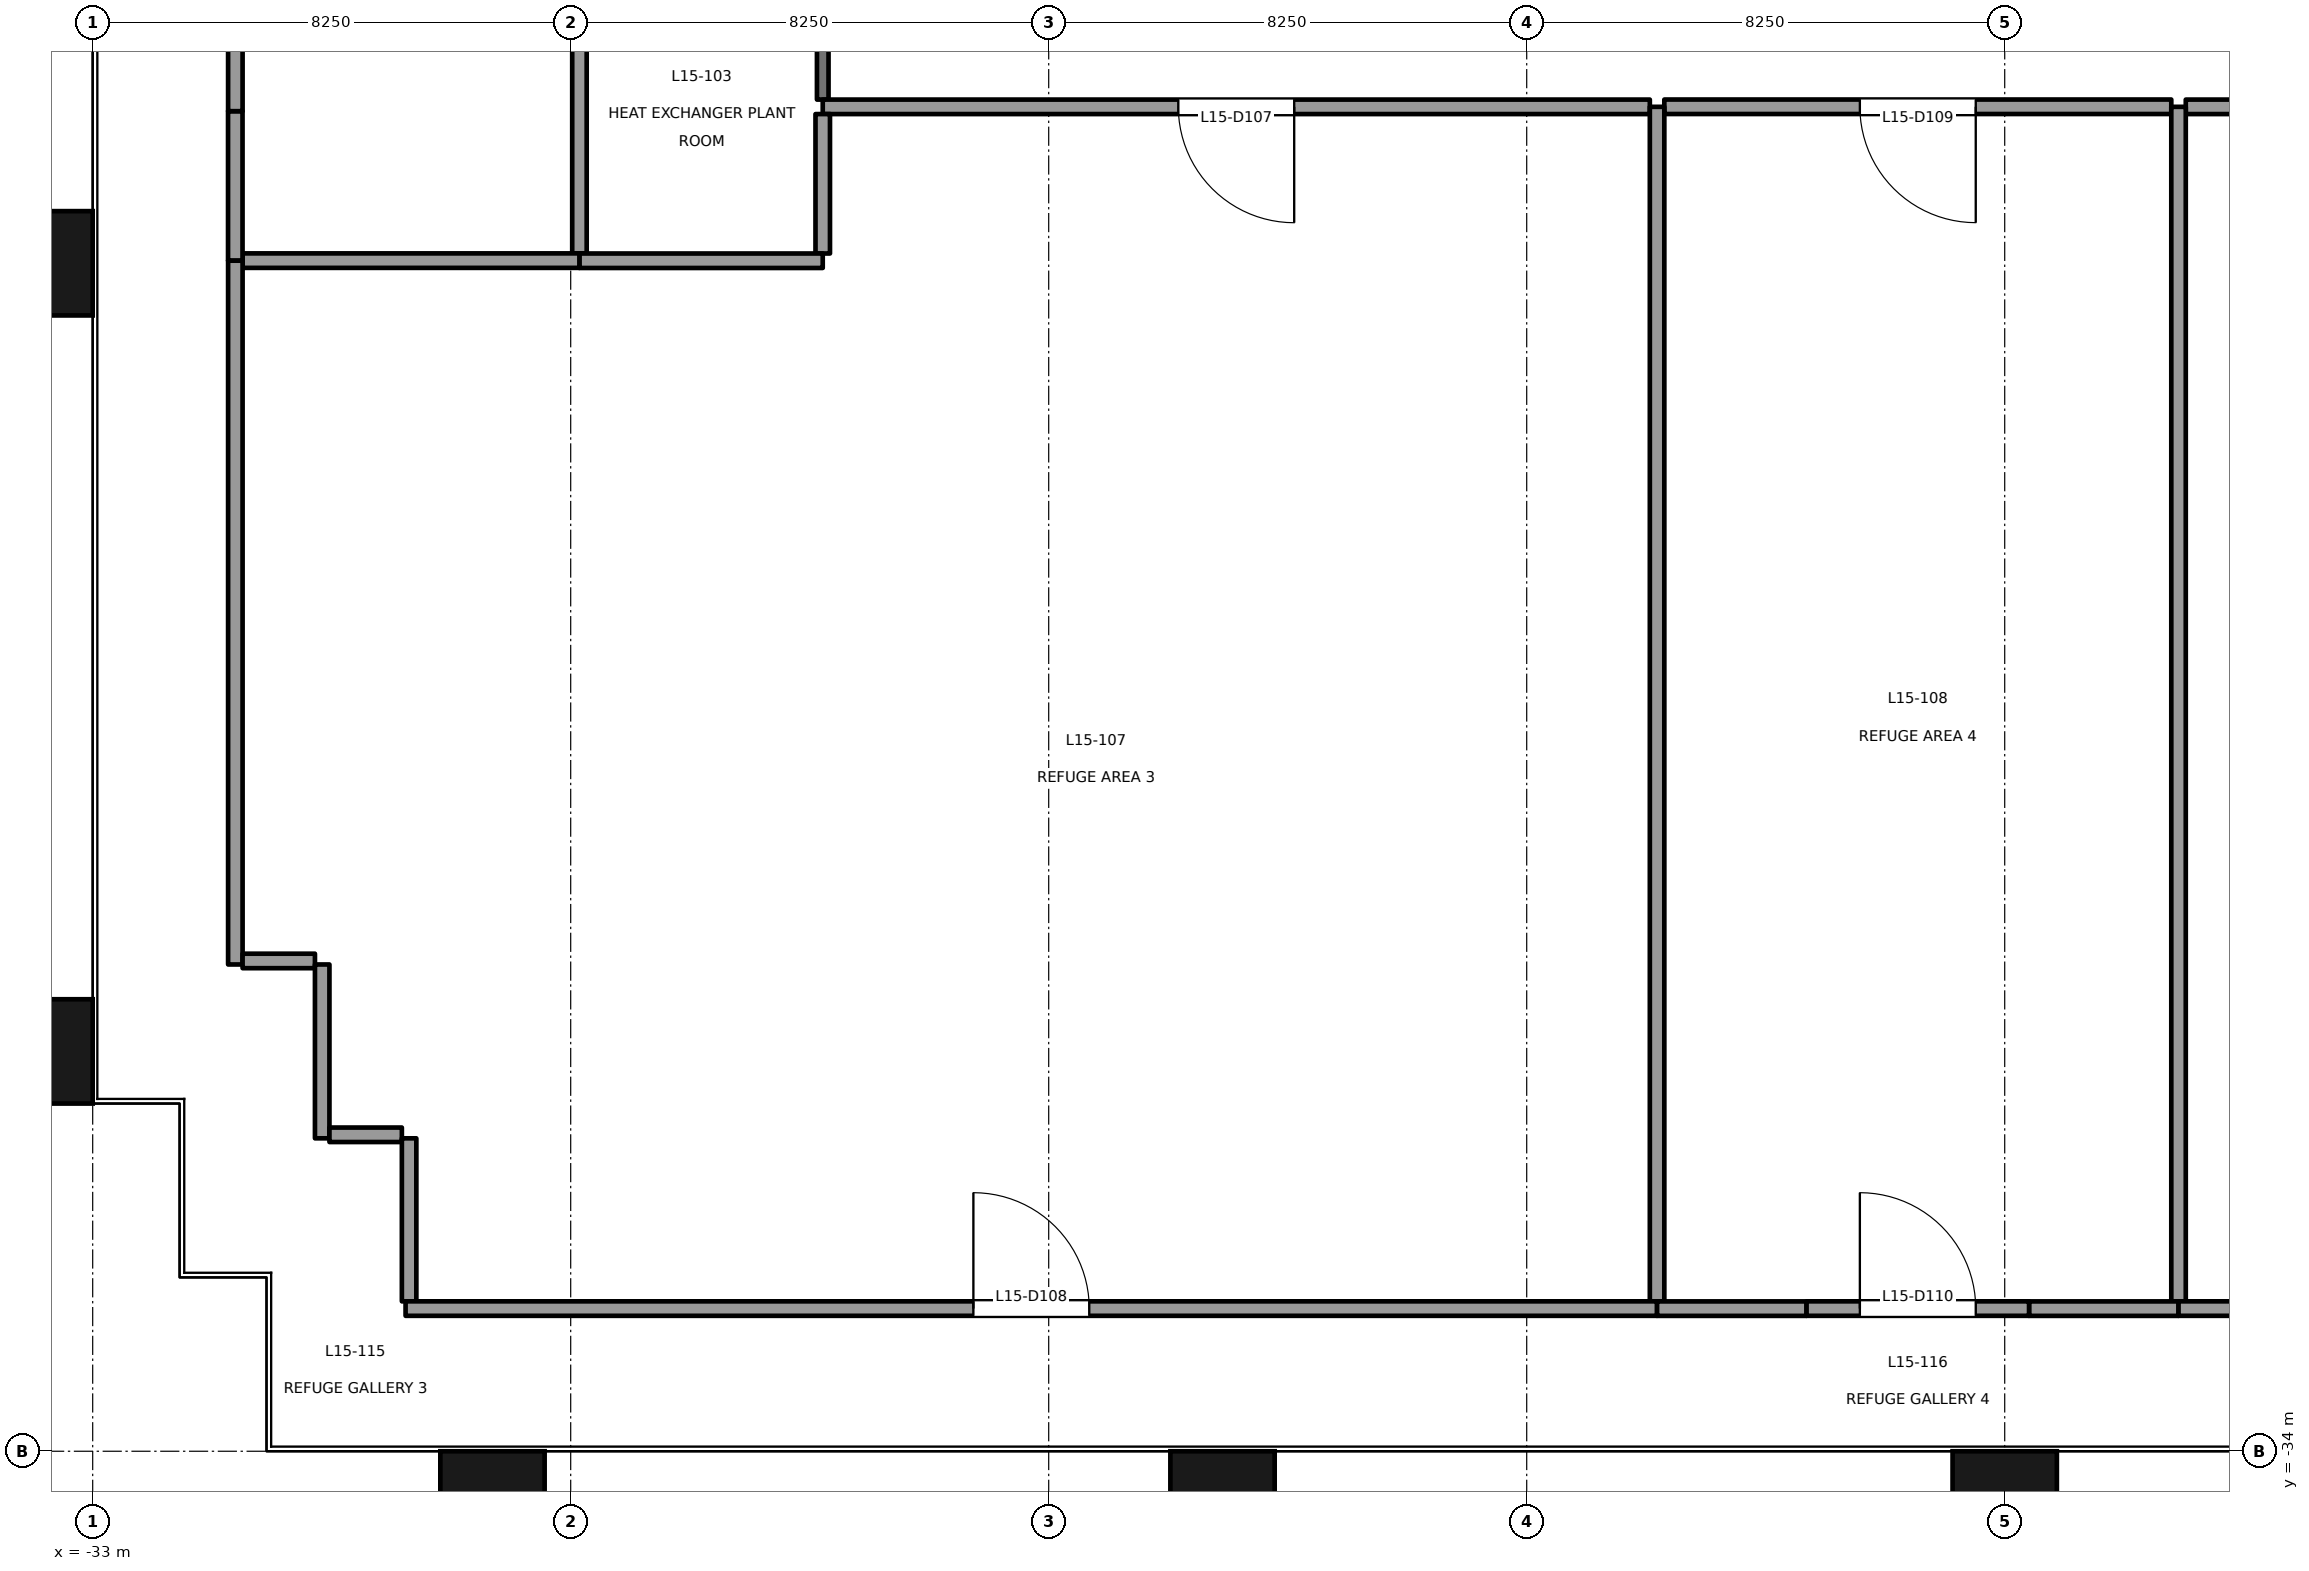
"""IFC4 building model, lengths in metres.
Left out: names, types, materials, properties, quantities, classifications, styles, units other than length and angle.
Written with IfcOpenShell. Run it as: python <this file> out.ifc"""

import sys

from ifc_helpers import new_model, si_unit, direction, frame, frame_2d, origin, origin_2d, place, context, subcontext, project, spatial, rectangle, extrude, element, fill, save


model = new_model("IFC4")
c1 = context("Model", 3, precision=1e-05, world=origin(), true_north=direction((0.0, 1.0)))
c2 = subcontext(c1, "Body", "Model", "MODEL_VIEW")
j1 = project(units=[si_unit("LENGTHUNIT", "METRE"), si_unit("PLANEANGLEUNIT", "RADIAN")], contexts=[c1])
p1 = place(None, origin())
s1 = spatial("IfcSite", under=j1, at=p1, CompositionType="ELEMENT")
p2 = place(p1, origin())
s2 = spatial("IfcBuilding", under=s1, at=p2, CompositionType="ELEMENT")
p3 = place(p2, frame((0.0, 0.0, 69.3)))
s3 = spatial("IfcBuildingStorey", under=s2, at=p3, CompositionType="ELEMENT", Elevation=69.3)
for number, where, z_axis, x_axis in (
    (1, (-26.1, -34.9, -0.2), (0.0, 0.0, 1.0), (1.0, 0.0, 0.0)),
    (2, (-13.5, -34.9, -0.2), (0.0, 0.0, 1.0), (1.0, 0.0, 0.0)),
    (3, (0.0, -34.9, -0.2), (0.0, 0.0, 1.0), (1.0, 0.0, 0.0)),
    (4, (-33.9, -27.1, -0.2), (0.0, 0.0, 1.0), (0.0, 1.0, 0.0)),
    (5, (-33.9, -13.5, -0.2), (0.0, 0.0, 1.0), (0.0, 1.0, 0.0)),
):
    element("IfcColumn", number, at=place(p3, frame(where, z_axis=z_axis, x_axis=x_axis)), inside=s3, PredefinedType="COLUMN", context=c2, shape_type="SweptSolid", body=[
        extrude(rectangle(XDim=1.8, YDim=1.8, at=origin_2d()), origin(), (0.0, 0.0, 1.0), 5.0),
    ])
p4 = place(p3, frame((-20.4, -10.675, 0.0), z_axis=(0.0, 0.0, 1.0), x_axis=(0.0, 1.0, 0.0)))
e6 = element("IfcWall", 6, at=p4, inside=s3, PredefinedType="PARTITIONING", context=c2, shape_type="SweptSolid", body=[
    extrude(rectangle(XDim=3.175, YDim=0.2, at=frame_2d((1.587, 0.0))), origin(), (0.0, 0.0, 1.0), 4.4),
])
p5 = place(p4, frame((1.137, 0.0, 0.0)))
e7 = element("IfcOpeningElement", 7, at=p5, cuts=e6, PredefinedType="OPENING", context=c2, shape_type="SweptSolid", body=[
    extrude(rectangle(XDim=0.9, YDim=2.1, at=frame_2d((0.45, 1.05))), frame((0.0, 0.111, 0.0), z_axis=(0.0, -1.0, 0.0), x_axis=(1.0, 0.0, 0.0)), (0.0, 0.0, 1.0), 0.221),
])
p6 = place(p3, frame((-6.125, -10.8, 0.0), z_axis=(0.0, 0.0, 1.0), x_axis=(-1.0, 0.0, 0.0)))
e8 = element("IfcWall", 8, at=p6, inside=s3, PredefinedType="PARTITIONING", context=c2, shape_type="SweptSolid", body=[
    extrude(rectangle(XDim=14.275, YDim=0.25, at=frame_2d((7.137, 0.0))), origin(), (0.0, 0.0, 1.0), 2.15),
])
p7 = place(p6, frame((6.138, 0.0, 0.0)))
e9 = element("IfcOpeningElement", 9, at=p7, cuts=e8, PredefinedType="OPENING", context=c2, shape_type="SweptSolid", body=[
    extrude(rectangle(XDim=2.0, YDim=2.1, at=frame_2d((1.0, 1.05))), frame((0.0, 0.135, 0.0), z_axis=(0.0, -1.0, 0.0), x_axis=(1.0, 0.0, 0.0)), (0.0, 0.0, 1.0), 0.271),
])
p8 = place(p3, frame((2.875, -10.799, 0.0), z_axis=(0.0, 0.0, 1.0), x_axis=(-1.0, 0.0, 0.0)))
e10 = element("IfcWall", 10, at=p8, inside=s3, PredefinedType="PARTITIONING", context=c2, shape_type="SweptSolid", body=[
    extrude(rectangle(XDim=8.75, YDim=0.25, at=frame_2d((4.375, 0.0))), origin(), (0.0, 0.0, 1.0), 3.8),
])
p9 = place(p8, frame((3.375, 0.0, 0.0)))
e11 = element("IfcOpeningElement", 11, at=p9, cuts=e10, PredefinedType="OPENING", context=c2, shape_type="SweptSolid", body=[
    extrude(rectangle(XDim=2.0, YDim=2.1, at=frame_2d((1.0, 1.05))), frame((0.0, 0.135, 0.0), z_axis=(0.0, -1.0, 0.0), x_axis=(1.0, 0.0, 0.0)), (0.0, 0.0, 1.0), 0.271),
])
p10 = place(p3, frame((20.4, -10.8, 0.0), z_axis=(0.0, 0.0, 1.0), x_axis=(-1.0, 0.0, 0.0)))
e12 = element("IfcWall", 12, at=p10, inside=s3, PredefinedType="PARTITIONING", context=c2, shape_type="SweptSolid", body=[
    extrude(rectangle(XDim=17.275, YDim=0.25, at=frame_2d((8.637, 0.0))), origin(), (0.0, 0.0, 1.0), 2.15),
])
p11 = place(p10, frame((7.638, 0.0, 0.0)))
e13 = element("IfcOpeningElement", 13, at=p11, cuts=e12, PredefinedType="OPENING", context=c2, shape_type="SweptSolid", body=[
    extrude(rectangle(XDim=2.0, YDim=2.1, at=frame_2d((1.0, 1.05))), frame((0.0, 0.135, 0.0), z_axis=(0.0, -1.0, 0.0), x_axis=(1.0, 0.0, 0.0)), (0.0, 0.0, 1.0), 0.271),
])
p12 = place(p3, frame((-24.599, -13.329, 0.0), z_axis=(0.0, 0.0, 1.0), x_axis=(0.0, 1.0, 0.0)))
e14 = element("IfcWall", 14, at=p12, inside=s3, PredefinedType="PARTITIONING", context=c2, shape_type="SweptSolid", body=[
    extrude(rectangle(XDim=5.874, YDim=0.25, at=frame_2d((2.937, 0.0))), origin(), (0.0, 0.0, 1.0), 2.75),
])
p13 = place(p3, frame((-20.4, -10.925, 0.0), z_axis=(0.0, 0.0, 1.0), x_axis=(0.0, -1.0, 0.0)))
e15 = element("IfcWall", 15, at=p13, inside=s3, PredefinedType="PARTITIONING", context=c2, shape_type="SweptSolid", body=[
    extrude(rectangle(XDim=2.406, YDim=0.25, at=frame_2d((1.203, 0.0))), origin(), (0.0, 0.0, 1.0), 2.75),
])
p14 = place(p3, frame((-20.4, -13.456, 0.0), z_axis=(0.0, 0.0, 1.0), x_axis=(-1.0, 0.0, 0.0)))
e16 = element("IfcWall", 16, at=p14, inside=s3, PredefinedType="PARTITIONING", context=c2, shape_type="SweptSolid", body=[
    extrude(rectangle(XDim=4.2, YDim=0.25, at=frame_2d((2.1, 0.0))), origin(), (0.0, 0.0, 1.0), 2.75),
])
p15 = place(p3, frame((-24.6, -13.454, 0.0), z_axis=(0.0, 0.0, 1.0), x_axis=(-1.0, 0.0, 0.0)))
e17 = element("IfcWall", 17, at=p15, inside=s3, PredefinedType="PARTITIONING", context=c2, shape_type="SweptSolid", body=[
    extrude(rectangle(XDim=5.813, YDim=0.25, at=frame_2d((2.906, 0.0))), origin(), (0.0, 0.0, 1.0), 2.75),
])
p16 = place(p3, frame((-30.539, -13.455, 0.0), z_axis=(0.0, 0.0, 1.0), x_axis=(0.0, 1.0, 0.0)))
e18 = element("IfcWall", 18, at=p16, inside=s3, PredefinedType="PARTITIONING", context=c2, shape_type="SweptSolid", body=[
    extrude(rectangle(XDim=2.58, YDim=0.25, at=frame_2d((1.29, 0.0))), origin(), (0.0, 0.0, 1.0), 2.75),
])
p17 = place(p3, frame((-30.538, -1.818, 0.0), z_axis=(0.0, 0.0, 1.0), x_axis=(0.0, -1.0, 0.0)))
e19 = element("IfcWall", 19, at=p17, inside=s3, PredefinedType="PARTITIONING", context=c2, shape_type="SweptSolid", body=[
    extrude(rectangle(XDim=9.057, YDim=0.25, at=frame_2d((4.528, 0.0))), origin(), (0.0, 0.0, 1.0), 4.8),
])
p18 = place(p17, frame((3.529, 0.0, 0.0)))
e20 = element("IfcOpeningElement", 20, at=p18, cuts=e19, PredefinedType="OPENING", context=c2, shape_type="SweptSolid", body=[
    extrude(rectangle(XDim=2.0, YDim=2.1, at=frame_2d((1.0, 1.05))), frame((0.0, 0.135, 0.0), z_axis=(0.0, -1.0, 0.0), x_axis=(1.0, 0.0, 0.0)), (0.0, 0.0, 1.0), 0.271),
])
p19 = place(p3, frame((-6.0, -10.8, 0.0), z_axis=(0.0, 0.0, 1.0), x_axis=(0.0, -1.0, 0.0)))
e21 = element("IfcWall", 21, at=p19, inside=s3, PredefinedType="PARTITIONING", context=c2, shape_type="SweptSolid", body=[
    extrude(rectangle(XDim=20.613, YDim=0.25, at=frame_2d((10.307, 0.0))), origin(), (0.0, 0.0, 1.0), 4.8),
])
p20 = place(p3, frame((-30.538, -25.6, 0.0), z_axis=(0.0, 0.0, 1.0), x_axis=(0.0, 1.0, 0.0)))
e22 = element("IfcWall", 22, at=p20, inside=s3, PredefinedType="PARTITIONING", context=c2, shape_type="SweptSolid", body=[
    extrude(rectangle(XDim=12.145, YDim=0.25, at=frame_2d((6.073, 0.0))), origin(), (0.0, 0.0, 1.0), 2.75),
])
p21 = place(p3, frame((-29.164, -25.539, 0.0), z_axis=(0.0, 0.0, 1.0), x_axis=(-1.0, 0.0, 0.0)))
e23 = element("IfcWall", 23, at=p21, inside=s3, PredefinedType="PARTITIONING", context=c2, shape_type="SweptSolid", body=[
    extrude(rectangle(XDim=1.249, YDim=0.25, at=frame_2d((0.625, 0.0))), origin(), (0.0, 0.0, 1.0), 4.8),
])
p22 = place(p3, frame((-29.039, -28.6, 0.0), z_axis=(0.0, 0.0, 1.0), x_axis=(0.0, 1.0, 0.0)))
e24 = element("IfcWall", 24, at=p22, inside=s3, PredefinedType="PARTITIONING", context=c2, shape_type="SweptSolid", body=[
    extrude(rectangle(XDim=3.0, YDim=0.25, at=frame_2d((1.5, 0.0))), origin(), (0.0, 0.0, 1.0), 4.8),
])
p23 = place(p3, frame((-27.664, -28.539, 0.0), z_axis=(0.0, 0.0, 1.0), x_axis=(-1.0, 0.0, 0.0)))
e25 = element("IfcWall", 25, at=p23, inside=s3, PredefinedType="PARTITIONING", context=c2, shape_type="SweptSolid", body=[
    extrude(rectangle(XDim=1.25, YDim=0.25, at=frame_2d((0.625, 0.0))), origin(), (0.0, 0.0, 1.0), 4.8),
])
p24 = place(p3, frame((-27.539, -31.413, 0.0), z_axis=(0.0, 0.0, 1.0), x_axis=(0.0, 1.0, 0.0)))
e26 = element("IfcWall", 26, at=p24, inside=s3, PredefinedType="PARTITIONING", context=c2, shape_type="SweptSolid", body=[
    extrude(rectangle(XDim=2.813, YDim=0.25, at=frame_2d((1.406, 0.0))), origin(), (0.0, 0.0, 1.0), 4.8),
])
p25 = place(p3, frame((-27.6, -31.538, 0.0), z_axis=(0.0, 0.0, 1.0), x_axis=(1.0, 0.0, 0.0)))
e27 = element("IfcWall", 27, at=p25, inside=s3, PredefinedType="PARTITIONING", context=c2, shape_type="SweptSolid", body=[
    extrude(rectangle(XDim=21.6, YDim=0.25, at=frame_2d((10.8, 0.0))), origin(), (0.0, 0.0, 1.0), 2.15),
])
p26 = place(p25, frame((9.8, 0.0, 0.0)))
e28 = element("IfcOpeningElement", 28, at=p26, cuts=e27, PredefinedType="OPENING", context=c2, shape_type="SweptSolid", body=[
    extrude(rectangle(XDim=2.0, YDim=2.1, at=frame_2d((1.0, 1.05))), frame((0.0, 0.135, 0.0), z_axis=(0.0, -1.0, 0.0), x_axis=(1.0, 0.0, 0.0)), (0.0, 0.0, 1.0), 0.271),
])
p27 = place(p3, frame((3.0, -10.8, 0.0), z_axis=(0.0, 0.0, 1.0), x_axis=(0.0, -1.0, 0.0)))
e29 = element("IfcWall", 29, at=p27, inside=s3, PredefinedType="PARTITIONING", context=c2, shape_type="SweptSolid", body=[
    extrude(rectangle(XDim=20.613, YDim=0.25, at=frame_2d((10.307, 0.0))), origin(), (0.0, 0.0, 1.0), 4.8),
])
p28 = place(p3, frame((3.0, -31.539, 0.0), z_axis=(0.0, 0.0, 1.0), x_axis=(-1.0, 0.0, 0.0)))
e30 = element("IfcWall", 30, at=p28, inside=s3, PredefinedType="PARTITIONING", context=c2, shape_type="SweptSolid", body=[
    extrude(rectangle(XDim=2.58, YDim=0.25, at=frame_2d((1.29, 0.0))), origin(), (0.0, 0.0, 1.0), 4.8),
])
p29 = place(p3, frame((-3.42, -31.539, 0.0), z_axis=(0.0, 0.0, 1.0), x_axis=(-1.0, 0.0, 0.0)))
e31 = element("IfcWall", 31, at=p29, inside=s3, PredefinedType="PARTITIONING", context=c2, shape_type="SweptSolid", body=[
    extrude(rectangle(XDim=2.58, YDim=0.25, at=frame_2d((1.29, 0.0))), origin(), (0.0, 0.0, 1.0), 3.8),
])
p30 = place(p3, frame((-3.42, -31.538, 0.0), z_axis=(0.0, 0.0, 1.0), x_axis=(1.0, 0.0, 0.0)))
e32 = element("IfcWall", 32, at=p30, inside=s3, PredefinedType="PARTITIONING", context=c2, shape_type="SweptSolid", body=[
    extrude(rectangle(XDim=3.84, YDim=0.25, at=frame_2d((1.92, 0.0))), origin(), (0.0, 0.0, 1.0), 3.8),
])
p31 = place(p30, frame((0.92, 0.0, 0.0)))
e33 = element("IfcOpeningElement", 33, at=p31, cuts=e32, PredefinedType="OPENING", context=c2, shape_type="SweptSolid", body=[
    extrude(rectangle(XDim=2.0, YDim=2.1, at=frame_2d((1.0, 1.05))), frame((0.0, 0.135, 0.0), z_axis=(0.0, -1.0, 0.0), x_axis=(1.0, 0.0, 0.0)), (0.0, 0.0, 1.0), 0.271),
])
p32 = place(p3, frame((3.0, -31.538, 0.0), z_axis=(0.0, 0.0, 1.0), x_axis=(1.0, 0.0, 0.0)))
e34 = element("IfcWall", 34, at=p32, inside=s3, PredefinedType="PARTITIONING", context=c2, shape_type="SweptSolid", body=[
    extrude(rectangle(XDim=24.6, YDim=0.25, at=frame_2d((12.3, 0.0))), origin(), (0.0, 0.0, 1.0), 2.15),
])
p33 = place(p32, frame((11.3, 0.0, 0.0)))
e35 = element("IfcOpeningElement", 35, at=p33, cuts=e34, PredefinedType="OPENING", context=c2, shape_type="SweptSolid", body=[
    extrude(rectangle(XDim=2.0, YDim=2.1, at=frame_2d((1.0, 1.05))), frame((0.0, 0.135, 0.0), z_axis=(0.0, -1.0, 0.0), x_axis=(1.0, 0.0, 0.0)), (0.0, 0.0, 1.0), 0.271),
])
p34 = place(p7, origin())
e36 = element("IfcDoor", 36, at=p34, inside=s3, OperationType="DOUBLE_DOOR_SINGLE_SWING", PredefinedType="DOOR", context=c2, shape_type="SweptSolid", body=[
    extrude(rectangle(XDim=2.0, YDim=2.1, at=frame_2d((1.0, 1.05))), frame((0.0, 0.025, 0.0), z_axis=(0.0, -1.0, 0.0), x_axis=(1.0, 0.0, 0.0)), (0.0, 0.0, 1.0), 0.05),
])
fill(e9, e36)
p35 = place(p26, origin())
e37 = element("IfcDoor", 37, at=p35, inside=s3, OperationType="DOUBLE_DOOR_SINGLE_SWING", PredefinedType="DOOR", context=c2, shape_type="SweptSolid", body=[
    extrude(rectangle(XDim=2.0, YDim=2.1, at=frame_2d((1.0, 1.05))), frame((0.0, 0.025, 0.0), z_axis=(0.0, -1.0, 0.0), x_axis=(1.0, 0.0, 0.0)), (0.0, 0.0, 1.0), 0.05),
])
fill(e28, e37)
p36 = place(p9, origin())
e38 = element("IfcDoor", 38, at=p36, inside=s3, OperationType="DOUBLE_DOOR_SINGLE_SWING", PredefinedType="DOOR", context=c2, shape_type="SweptSolid", body=[
    extrude(rectangle(XDim=2.0, YDim=2.1, at=frame_2d((1.0, 1.05))), frame((0.0, 0.025, 0.0), z_axis=(0.0, -1.0, 0.0), x_axis=(1.0, 0.0, 0.0)), (0.0, 0.0, 1.0), 0.05),
])
fill(e11, e38)
p37 = place(p31, origin())
e39 = element("IfcDoor", 39, at=p37, inside=s3, OperationType="DOUBLE_DOOR_SINGLE_SWING", PredefinedType="DOOR", context=c2, shape_type="SweptSolid", body=[
    extrude(rectangle(XDim=2.0, YDim=2.1, at=frame_2d((1.0, 1.05))), frame((0.0, 0.025, 0.0), z_axis=(0.0, -1.0, 0.0), x_axis=(1.0, 0.0, 0.0)), (0.0, 0.0, 1.0), 0.05),
])
fill(e33, e39)
save(model, sys.argv[1])
